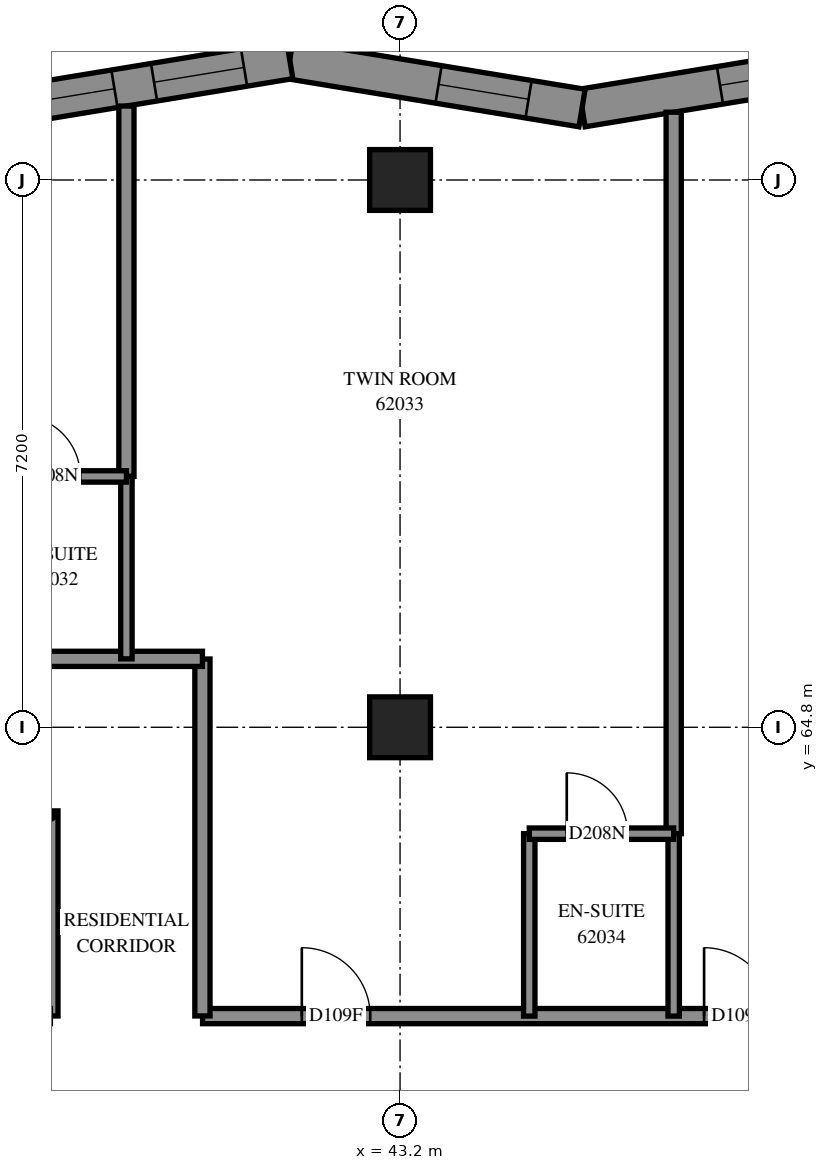
"""IFC4 building model, lengths in metres.
Left out: names, types, materials, properties, quantities, classifications, styles, units other than length and angle.
Written with IfcOpenShell. Run it as: python <this file> out.ifc"""

import sys

from ifc_helpers import new_model, si_unit, direction, frame, frame_2d, origin, origin_2d, place, context, subcontext, project, spatial, polyline, rectangle, outline, extrude, element, fill, save


model = new_model("IFC4")
c1 = context("Model", 3, precision=1e-05, world=origin(), true_north=direction((0.0, 1.0)))
c2 = subcontext(c1, "Body", "Model", "MODEL_VIEW")
j1 = project(units=[si_unit("LENGTHUNIT", "METRE"), si_unit("PLANEANGLEUNIT", "RADIAN")], contexts=[c1])
p1 = place(None, origin())
s1 = spatial("IfcSite", under=j1, at=p1, CompositionType="ELEMENT")
p2 = place(p1, origin())
s2 = spatial("IfcBuilding", under=s1, at=p2, CompositionType="ELEMENT")
p3 = place(p2, frame((0.0, 0.0, 227.0)))
s3 = spatial("IfcBuildingStorey", under=s2, at=p3, CompositionType="ELEMENT", Elevation=227.0)
for number, where, z_axis, x_axis in (
    (1, (43.2, 64.8, 0.0), (0.0, 0.0, 1.0), (1.0, 0.0, 0.0)),
    (2, (43.2, 72.0, 0.0), (0.0, 0.0, 1.0), (1.0, 0.0, 0.0)),
):
    element("IfcColumn", number, at=place(p3, frame(where, z_axis=z_axis, x_axis=x_axis)), inside=s3, PredefinedType="COLUMN", context=c2, shape_type="SweptSolid", body=[
        extrude(rectangle(XDim=0.8, YDim=0.8, at=origin_2d()), origin(), (0.0, 0.0, 1.0), 3.1),
    ])
p4 = place(p3, frame((49.44, 73.58, 0.0), z_axis=(0.0, 0.0, 1.0), x_axis=(-0.9867206744, -0.1624263241, 0.0)))
e3 = element("IfcWall", 3, at=p4, inside=s3, PredefinedType="SOLIDWALL", context=c2, shape_type="SweptSolid", body=[
    extrude(outline(polyline([(-0.041, -0.25), (3.856, -0.25), (3.938, 0.25), (0.041, 0.25), (-0.041, -0.25)])), origin(), (0.0, 0.0, 1.0), 3.1),
])
p5 = place(p4, frame((0.858, 0.0, 0.45)))
e4 = element("IfcOpeningElement", 4, at=p5, cuts=e3, PredefinedType="OPENING", context=c2, shape_type="SweptSolid", body=[
    extrude(rectangle(XDim=1.2, YDim=2.5, at=frame_2d((0.6, 1.25))), frame((0.0, 0.26, 0.0), z_axis=(0.0, -1.0, 0.0), x_axis=(1.0, 0.0, 0.0)), (0.0, 0.0, 1.0), 0.52),
])
p6 = place(p3, frame((45.594, 72.947, 0.0), z_axis=(0.0, 0.0, 1.0), x_axis=(-0.9867213513, 0.1624222118, 0.0)))
e5 = element("IfcWall", 5, at=p6, inside=s3, PredefinedType="SOLIDWALL", context=c2, shape_type="SweptSolid", body=[
    extrude(outline(polyline([(0.041, -0.25), (3.938, -0.25), (3.856, 0.25), (-0.041, 0.25), (0.041, -0.25)])), origin(), (0.0, 0.0, 1.0), 3.1),
])
p7 = place(p6, frame((0.713, 0.0, 0.45)))
e6 = element("IfcOpeningElement", 6, at=p7, cuts=e5, PredefinedType="OPENING", context=c2, shape_type="SweptSolid", body=[
    extrude(rectangle(XDim=1.2, YDim=2.5, at=frame_2d((0.6, 1.25))), frame((0.0, 0.26, 0.0), z_axis=(0.0, -1.0, 0.0), x_axis=(1.0, 0.0, 0.0)), (0.0, 0.0, 1.0), 0.52),
])
p8 = place(p3, frame((41.749, 73.58, 0.0), z_axis=(0.0, 0.0, 1.0), x_axis=(-0.9867213513, -0.1624222118, 0.0)))
e7 = element("IfcWall", 7, at=p8, inside=s3, PredefinedType="SOLIDWALL", context=c2, shape_type="SweptSolid", body=[
    extrude(outline(polyline([(-0.041, -0.25), (3.856, -0.25), (3.938, 0.25), (0.041, 0.25), (-0.041, -0.25)])), origin(), (0.0, 0.0, 1.0), 3.1),
])
p9 = place(p8, frame((0.61, 0.0, 0.45)))
e8 = element("IfcOpeningElement", 8, at=p9, cuts=e7, PredefinedType="OPENING", context=c2, shape_type="SweptSolid", body=[
    extrude(rectangle(XDim=1.2, YDim=2.5, at=frame_2d((0.6, 1.25))), frame((0.0, 0.26, 0.0), z_axis=(0.0, -1.0, 0.0), x_axis=(1.0, 0.0, 0.0)), (0.0, 0.0, 1.0), 0.52),
])
p10 = place(p8, frame((2.337, 0.0, 0.45)))
e9 = element("IfcOpeningElement", 9, at=p10, cuts=e7, PredefinedType="OPENING", context=c2, shape_type="SweptSolid", body=[
    extrude(rectangle(XDim=1.2, YDim=2.5, at=frame_2d((0.6, 1.25))), frame((0.0, 0.26, 0.0), z_axis=(0.0, -1.0, 0.0), x_axis=(1.0, 0.0, 0.0)), (0.0, 0.0, 1.0), 0.52),
])
p11 = place(p3, frame((40.602, 61.0, 0.0), z_axis=(0.0, 0.0, 1.0), x_axis=(1.0, 0.0, 0.0)))
e10 = element("IfcWall", 10, at=p11, inside=s3, PredefinedType="PARTITIONING", context=c2, shape_type="SweptSolid", body=[
    extrude(rectangle(XDim=14.998, YDim=0.2, at=frame_2d((7.499, 0.0))), origin(), (0.0, 0.0, 1.0), 3.1),
])
p12 = place(p11, frame((1.306, 0.0, 0.0)))
e11 = element("IfcOpeningElement", 11, at=p12, cuts=e10, PredefinedType="OPENING", context=c2, shape_type="SweptSolid", body=[
    extrude(rectangle(XDim=0.9, YDim=2.1, at=frame_2d((0.45, 1.05))), frame((0.0, 0.11, 0.0), z_axis=(0.0, -1.0, 0.0), x_axis=(1.0, 0.0, 0.0)), (0.0, 0.0, 1.0), 0.22),
])
p13 = place(p11, frame((6.598, 0.0, 0.0)))
e12 = element("IfcOpeningElement", 12, at=p13, cuts=e10, PredefinedType="OPENING", context=c2, shape_type="SweptSolid", body=[
    extrude(rectangle(XDim=0.9, YDim=2.1, at=frame_2d((0.45, 1.05))), frame((0.0, 0.11, 0.0), z_axis=(0.0, -1.0, 0.0), x_axis=(1.0, 0.0, 0.0)), (0.0, 0.0, 1.0), 0.22),
])
p14 = place(p11, frame((12.098, 0.0, 0.0)))
e13 = element("IfcOpeningElement", 13, at=p14, cuts=e10, PredefinedType="OPENING", context=c2, shape_type="SweptSolid", body=[
    extrude(rectangle(XDim=0.9, YDim=2.1, at=frame_2d((0.45, 1.05))), frame((0.0, 0.11, 0.0), z_axis=(0.0, -1.0, 0.0), x_axis=(1.0, 0.0, 0.0)), (0.0, 0.0, 1.0), 0.22),
])
p15 = place(p11, frame((13.752, 0.0, 0.0)))
e14 = element("IfcOpeningElement", 14, at=p15, cuts=e10, PredefinedType="OPENING", context=c2, shape_type="SweptSolid", body=[
    extrude(rectangle(XDim=1.0, YDim=2.1, at=frame_2d((0.5, 1.05))), frame((0.0, 0.11, 0.0), z_axis=(0.0, -1.0, 0.0), x_axis=(1.0, 0.0, 0.0)), (0.0, 0.0, 1.0), 0.22),
])
p16 = place(p3, frame((46.8, 63.4, 0.0), z_axis=(0.0, 0.0, 1.0), x_axis=(0.0, 1.0, 0.0)))
e15 = element("IfcWall", 15, at=p16, inside=s3, PredefinedType="PARTITIONING", context=c2, shape_type="SweptSolid", body=[
    extrude(rectangle(XDim=9.492, YDim=0.2, at=frame_2d((4.746, 0.0))), origin(), (0.0, 0.0, 1.0), 3.1),
])
p17 = place(p3, frame((39.6, 68.1, 0.0), z_axis=(0.0, 0.0, 1.0), x_axis=(0.0, 1.0, 0.0)))
e16 = element("IfcWall", 16, at=p17, inside=s3, PredefinedType="PARTITIONING", context=c2, shape_type="SweptSolid", body=[
    extrude(rectangle(XDim=4.872, YDim=0.2, at=frame_2d((2.436, 0.0))), origin(), (0.0, 0.0, 1.0), 3.1),
])
p18 = place(p3, frame((40.6, 61.002, 0.0), z_axis=(0.0, 0.0, 1.0), x_axis=(0.0, 1.0, 0.0)))
e17 = element("IfcWall", 17, at=p18, inside=s3, PredefinedType="PARTITIONING", context=c2, shape_type="SweptSolid", body=[
    extrude(rectangle(XDim=4.696, YDim=0.2, at=frame_2d((2.348, 0.0))), origin(), (0.0, 0.0, 1.0), 3.1),
])
p19 = place(p3, frame((37.7, 65.7, 0.0), z_axis=(0.0, 0.0, 1.0), x_axis=(1.0, 0.0, 0.0)))
e18 = element("IfcWall", 18, at=p19, inside=s3, PredefinedType="PARTITIONING", context=c2, shape_type="SweptSolid", body=[
    extrude(rectangle(XDim=2.9, YDim=0.2, at=frame_2d((1.45, 0.0))), origin(), (0.0, 0.0, 1.0), 3.1),
])
p20 = place(p3, frame((38.6, 61.002, 0.0), z_axis=(0.0, 0.0, 1.0), x_axis=(0.0, 1.0, 0.0)))
e19 = element("IfcWall", 19, at=p20, inside=s3, PredefinedType="PARTITIONING", context=c2, shape_type="SweptSolid", body=[
    extrude(rectangle(XDim=2.698, YDim=0.2, at=frame_2d((1.349, 0.0))), origin(), (0.0, 0.0, 1.0), 3.1),
])
for number, where, z_axis, x_axis in (
    (20, (44.9, 61.0, 0.0), (0.0, 0.0, 1.0), (0.0, 1.0, 0.0)),
    (21, (46.8, 61.0, 0.0), (0.0, 0.0, 1.0), (0.0, 1.0, 0.0)),
    (22, (39.6, 65.7, 0.0), (0.0, 0.0, 1.0), (0.0, 1.0, 0.0)),
):
    element("IfcWall", number, at=place(p3, frame(where, z_axis=z_axis, x_axis=x_axis)), inside=s3, PredefinedType="PARTITIONING", context=c2, shape_type="SweptSolid", body=[
        extrude(rectangle(XDim=2.4, YDim=0.15, at=frame_2d((1.2, 0.0))), origin(), (0.0, 0.0, 1.0), 3.1),
    ])
p21 = place(p3, frame((37.7, 68.1, 0.0), z_axis=(0.0, 0.0, 1.0), x_axis=(1.0, 0.0, 0.0)))
e23 = element("IfcWall", 23, at=p21, inside=s3, PredefinedType="PARTITIONING", context=c2, shape_type="SweptSolid", body=[
    extrude(rectangle(XDim=1.9, YDim=0.15, at=frame_2d((0.95, 0.0))), origin(), (0.0, 0.0, 1.0), 3.1),
])
p22 = place(p21, frame((0.493, 0.0, 0.0)))
e24 = element("IfcOpeningElement", 24, at=p22, cuts=e23, PredefinedType="OPENING", context=c2, shape_type="SweptSolid", body=[
    extrude(rectangle(XDim=0.8, YDim=2.1, at=frame_2d((0.4, 1.05))), frame((0.0, 0.085, 0.0), z_axis=(0.0, -1.0, 0.0), x_axis=(1.0, 0.0, 0.0)), (0.0, 0.0, 1.0), 0.17),
])
p23 = place(p3, frame((44.9, 63.4, 0.0), z_axis=(0.0, 0.0, 1.0), x_axis=(1.0, 0.0, 0.0)))
e25 = element("IfcWall", 25, at=p23, inside=s3, PredefinedType="PARTITIONING", context=c2, shape_type="SweptSolid", body=[
    extrude(rectangle(XDim=1.9, YDim=0.15, at=frame_2d((0.95, 0.0))), origin(), (0.0, 0.0, 1.0), 3.1),
])
p24 = place(p23, frame((0.493, 0.0, 0.0)))
e26 = element("IfcOpeningElement", 26, at=p24, cuts=e25, PredefinedType="OPENING", context=c2, shape_type="SweptSolid", body=[
    extrude(rectangle(XDim=0.8, YDim=2.1, at=frame_2d((0.4, 1.05))), frame((0.0, 0.085, 0.0), z_axis=(0.0, -1.0, 0.0), x_axis=(1.0, 0.0, 0.0)), (0.0, 0.0, 1.0), 0.17),
])
p25 = place(p3, frame((37.65, 63.15, 0.0), z_axis=(0.0, 0.0, 1.0), x_axis=(0.8654262855, 0.5010362705, 0.0)))
e27 = element("IfcWall", 27, at=p25, inside=s3, PredefinedType="PARTITIONING", context=c2, shape_type="SweptSolid", body=[
    extrude(rectangle(XDim=1.098, YDim=0.2, at=frame_2d((0.549, 0.0))), origin(), (0.0, 0.0, 1.0), 3.1),
])
p26 = place(p5, origin())
e28 = element("IfcWindow", 28, at=p26, inside=s3, PartitioningType="SINGLE_PANEL", PredefinedType="WINDOW", context=c2, shape_type="SweptSolid", body=[
    extrude(rectangle(XDim=1.2, YDim=2.5, at=frame_2d((0.6, 1.25))), frame((0.0, 0.18, 0.0), z_axis=(0.0, -1.0, 0.0), x_axis=(1.0, 0.0, 0.0)), (0.0, 0.0, 1.0), 0.06),
])
fill(e4, e28)
p27 = place(p7, origin())
e29 = element("IfcWindow", 29, at=p27, inside=s3, PartitioningType="SINGLE_PANEL", PredefinedType="WINDOW", context=c2, shape_type="SweptSolid", body=[
    extrude(rectangle(XDim=1.2, YDim=2.5, at=frame_2d((0.6, 1.25))), frame((0.0, 0.18, 0.0), z_axis=(0.0, -1.0, 0.0), x_axis=(1.0, 0.0, 0.0)), (0.0, 0.0, 1.0), 0.06),
])
fill(e6, e29)
p28 = place(p9, origin())
e30 = element("IfcWindow", 30, at=p28, inside=s3, PartitioningType="SINGLE_PANEL", PredefinedType="WINDOW", context=c2, shape_type="SweptSolid", body=[
    extrude(rectangle(XDim=1.2, YDim=2.5, at=frame_2d((0.6, 1.25))), frame((0.0, 0.18, 0.0), z_axis=(0.0, -1.0, 0.0), x_axis=(1.0, 0.0, 0.0)), (0.0, 0.0, 1.0), 0.06),
])
fill(e8, e30)
p29 = place(p10, origin())
e31 = element("IfcWindow", 31, at=p29, inside=s3, PartitioningType="SINGLE_PANEL", PredefinedType="WINDOW", context=c2, shape_type="SweptSolid", body=[
    extrude(rectangle(XDim=1.2, YDim=2.5, at=frame_2d((0.6, 1.25))), frame((0.0, 0.18, 0.0), z_axis=(0.0, -1.0, 0.0), x_axis=(1.0, 0.0, 0.0)), (0.0, 0.0, 1.0), 0.06),
])
fill(e9, e31)
p30 = place(p22, origin())
e32 = element("IfcDoor", 32, at=p30, inside=s3, OperationType="SINGLE_SWING_RIGHT", PredefinedType="DOOR", context=c2, shape_type="SweptSolid", body=[
    extrude(rectangle(XDim=0.8, YDim=2.1, at=frame_2d((0.4, 1.05))), frame((0.0, 0.025, 0.0), z_axis=(0.0, -1.0, 0.0), x_axis=(1.0, 0.0, 0.0)), (0.0, 0.0, 1.0), 0.05),
])
fill(e24, e32)
p31 = place(p12, origin())
e33 = element("IfcDoor", 33, at=p31, inside=s3, OperationType="SINGLE_SWING_LEFT", PredefinedType="DOOR", context=c2, shape_type="SweptSolid", body=[
    extrude(rectangle(XDim=0.9, YDim=2.1, at=frame_2d((0.45, 1.05))), frame((0.0, 0.025, 0.0), z_axis=(0.0, -1.0, 0.0), x_axis=(1.0, 0.0, 0.0)), (0.0, 0.0, 1.0), 0.05),
])
fill(e11, e33)
p32 = place(p24, origin())
e34 = element("IfcDoor", 34, at=p32, inside=s3, OperationType="SINGLE_SWING_RIGHT", PredefinedType="DOOR", context=c2, shape_type="SweptSolid", body=[
    extrude(rectangle(XDim=0.8, YDim=2.1, at=frame_2d((0.4, 1.05))), frame((0.0, 0.025, 0.0), z_axis=(0.0, -1.0, 0.0), x_axis=(1.0, 0.0, 0.0)), (0.0, 0.0, 1.0), 0.05),
])
fill(e26, e34)
p33 = place(p13, origin())
e35 = element("IfcDoor", 35, at=p33, inside=s3, OperationType="SINGLE_SWING_LEFT", PredefinedType="DOOR", context=c2, shape_type="SweptSolid", body=[
    extrude(rectangle(XDim=0.9, YDim=2.1, at=frame_2d((0.45, 1.05))), frame((0.0, 0.025, 0.0), z_axis=(0.0, -1.0, 0.0), x_axis=(1.0, 0.0, 0.0)), (0.0, 0.0, 1.0), 0.05),
])
fill(e12, e35)
save(model, sys.argv[1])
